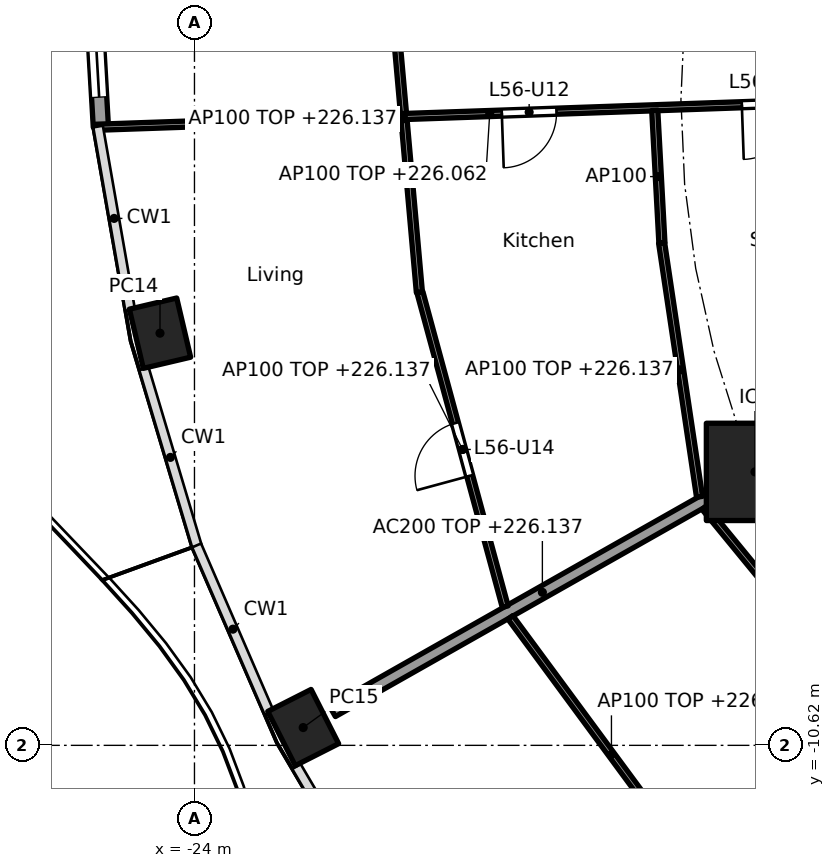
"""IFC4 building model, lengths in metres.
Left out: names, types, materials, properties, quantities, classifications, styles, units other than length and angle.
Written with IfcOpenShell. Run it as: python <this file> out.ifc"""

import sys

from ifc_helpers import new_model, si_unit, direction, frame, frame_2d, origin, origin_2d, place, context, subcontext, project, spatial, rectangle, hollow_rectangle, extrude, element, fill, save


model = new_model("IFC4")
c1 = context("Model", 3, precision=1e-05, world=origin(), true_north=direction((0.0, 1.0)))
c2 = subcontext(c1, "Body", "Model", "MODEL_VIEW")
j1 = project(units=[si_unit("LENGTHUNIT", "METRE"), si_unit("PLANEANGLEUNIT", "RADIAN")], contexts=[c1])
p1 = place(None, origin())
s1 = spatial("IfcSite", under=j1, at=p1, CompositionType="ELEMENT")
p2 = place(p1, origin())
s2 = spatial("IfcBuilding", under=s1, at=p2, CompositionType="ELEMENT")
p3 = place(p2, frame((0.0, 0.0, 223.3)))
s3 = spatial("IfcBuildingStorey", under=s2, at=p3, CompositionType="ELEMENT", Elevation=223.3)
for number, where, z_axis, x_axis in (
    (1, (-24.567, -3.842, 0.0), (0.0, 0.0, 1.0), (0.229, -0.973, 0.0)),
    (2, (-22.212, -10.327, 0.0), (0.0, 0.0, 1.0), (0.452, -0.892, 0.0)),
):
    element("IfcColumn", number, at=place(p3, frame(where, z_axis=z_axis, x_axis=x_axis)), inside=s3, PredefinedType="COLUMN", context=c2, shape_type="SweptSolid", body=[
        extrude(hollow_rectangle(XDim=1.0, YDim=0.8, WallThickness=0.032, at=origin_2d()), origin(), (0.0, 0.0, 1.0), 3.7),
    ])
p4 = place(p3, frame((-14.782, -6.123, 0.0), z_axis=(0.0, 0.0, 1.0), x_axis=(1.0, 0.0, 0.0)))
e3 = element("IfcColumn", 3, at=p4, inside=s3, PredefinedType="COLUMN", context=c2, shape_type="SweptSolid", body=[
    extrude(rectangle(XDim=1.6, YDim=1.6, at=origin_2d()), origin(), (0.0, 0.0, 1.0), 3.7),
])
p5 = place(p3, frame((-25.539, -0.45, 0.0), z_axis=(0.0, 0.0, 1.0), x_axis=(-0.057528189427, 0.998343882348, 0.0)))
e4 = element("IfcWall", 4, at=p5, inside=s3, PredefinedType="SOLIDWALL", context=c2, shape_type="SweptSolid", body=[
    extrude(rectangle(XDim=3.081, YDim=0.25, at=frame_2d((1.541, 0.0))), origin(), (0.0, 0.0, 1.0), 3.44),
])
p6 = place(p5, frame((0.49, 0.0, 0.0)))
e5 = element("IfcOpeningElement", 5, at=p6, cuts=e4, PredefinedType="OPENING", context=c2, shape_type="SweptSolid", body=[
    extrude(rectangle(XDim=2.1, YDim=2.4, at=frame_2d((1.05, 1.2))), frame((0.0, 0.135, 0.0), z_axis=(0.0, -1.0, 0.0), x_axis=(1.0, 0.0, 0.0)), (0.0, 0.0, 1.0), 0.27),
])
p7 = place(p3, frame((-14.825, -6.148, 0.0), z_axis=(0.0, 0.0, 1.0), x_axis=(-0.870099576105, -0.492875975944, 0.0)))
e6 = element("IfcWall", 6, at=p7, inside=s3, PredefinedType="PARTITIONING", context=c2, shape_type="SweptSolid", body=[
    extrude(rectangle(XDim=7.937, YDim=0.2, at=frame_2d((3.969, 0.0))), origin(), (0.0, 0.0, 1.0), 2.837),
])
p8 = place(p3, frame((-20.81, 2.542, 0.0), z_axis=(0.0, 0.0, 1.0), x_axis=(0.088651453697, -0.996062708748, 0.0)))
e7 = element("IfcWall", 7, at=p8, inside=s3, PredefinedType="PARTITIONING", context=c2, shape_type="SweptSolid", body=[
    extrude(rectangle(XDim=5.737, YDim=0.1, at=frame_2d((2.868, 0.0))), origin(), (0.0, 0.0, 1.0), 2.837),
])
p9 = place(p3, frame((-12.665, -0.003, 0.0), z_axis=(0.0, 0.0, 1.0), x_axis=(-0.999390583608, -0.034906466382, 0.0)))
e8 = element("IfcWall", 8, at=p9, inside=s3, PredefinedType="PARTITIONING", context=c2, shape_type="SweptSolid", body=[
    extrude(rectangle(XDim=12.967, YDim=0.1, at=frame_2d((6.483, 0.0))), origin(), (0.0, 0.0, 1.0), 2.762),
])
p10 = place(p9, frame((1.435, 0.0, 0.0)))
e9 = element("IfcOpeningElement", 9, at=p10, cuts=e8, PredefinedType="OPENING", context=c2, shape_type="SweptSolid", body=[
    extrude(rectangle(XDim=0.9, YDim=2.1, at=frame_2d((0.45, 1.05))), frame((0.0, 0.06, 0.0), z_axis=(0.0, -1.0, 0.0), x_axis=(1.0, 0.0, 0.0)), (0.0, 0.0, 1.0), 0.12),
])
p11 = place(p9, frame((5.385, 0.0, 0.0)))
e10 = element("IfcOpeningElement", 10, at=p11, cuts=e8, PredefinedType="OPENING", context=c2, shape_type="SweptSolid", body=[
    extrude(rectangle(XDim=0.9, YDim=2.1, at=frame_2d((0.45, 1.05))), frame((0.0, 0.06, 0.0), z_axis=(0.0, -1.0, 0.0), x_axis=(1.0, 0.0, 0.0)), (0.0, 0.0, 1.0), 0.12),
])
p12 = place(p3, frame((-16.431, -0.178, 0.0), z_axis=(0.0, 0.0, 1.0), x_axis=(0.053951127036, -0.998543577362, 0.0)))
e11 = element("IfcWall", 11, at=p12, inside=s3, PredefinedType="PARTITIONING", context=c2, shape_type="SweptSolid", body=[
    extrude(rectangle(XDim=2.181, YDim=0.1, at=frame_2d((1.091, 0.0))), origin(), (0.0, 0.0, 1.0), 3.44),
])
p13 = place(p3, frame((-16.318, -2.356, 0.0), z_axis=(0.0, 0.0, 1.0), x_axis=(0.147684413341, -0.989034536331, 0.0)))
e12 = element("IfcWall", 12, at=p13, inside=s3, PredefinedType="PARTITIONING", context=c2, shape_type="SweptSolid", body=[
    extrude(rectangle(XDim=4.222, YDim=0.1, at=frame_2d((2.111, 0.0))), origin(), (0.0, 0.0, 1.0), 2.837),
])
p14 = place(p3, frame((-20.292, -3.17, 0.0), z_axis=(0.0, 0.0, 1.0), x_axis=(0.26187906236, -0.965100697698, 0.0)))
e13 = element("IfcWall", 13, at=p14, inside=s3, PredefinedType="PARTITIONING", context=c2, shape_type="SweptSolid", body=[
    extrude(rectangle(XDim=5.356, YDim=0.1, at=frame_2d((2.678, 0.0))), origin(), (0.0, 0.0, 1.0), 2.837),
])
p15 = place(p14, frame((2.228, 0.0, 0.0)))
e14 = element("IfcOpeningElement", 14, at=p15, cuts=e13, PredefinedType="OPENING", context=c2, shape_type="SweptSolid", body=[
    extrude(rectangle(XDim=0.9, YDim=2.1, at=frame_2d((0.45, 1.05))), frame((0.0, 0.06, 0.0), z_axis=(0.0, -1.0, 0.0), x_axis=(1.0, 0.0, 0.0)), (0.0, 0.0, 1.0), 0.12),
])
p16 = place(p3, frame((-15.616, -6.708, 0.0), z_axis=(0.0, 0.0, 1.0), x_axis=(0.634076422357, -0.773270386483, 0.0)))
e15 = element("IfcWall", 15, at=p16, inside=s3, PredefinedType="PARTITIONING", context=c2, shape_type="SweptSolid", body=[
    extrude(rectangle(XDim=4.611, YDim=0.1, at=frame_2d((2.306, 0.0))), origin(), (0.0, 0.0, 1.0), 2.837),
])
p17 = place(p3, frame((-18.804, -8.516, 0.0), z_axis=(0.0, 0.0, 1.0), x_axis=(0.593249583583, -0.805018590828, 0.0)))
e16 = element("IfcWall", 16, at=p17, inside=s3, PredefinedType="PARTITIONING", context=c2, shape_type="SweptSolid", body=[
    extrude(rectangle(XDim=5.602, YDim=0.1, at=frame_2d((2.801, 0.0))), origin(), (0.0, 0.0, 1.0), 2.837),
])
p18 = place(p6, origin())
e17 = element("IfcDoor", 17, at=p18, inside=s3, OperationType="SLIDING_TO_LEFT", PredefinedType="DOOR", context=c2, shape_type="SweptSolid", body=[
    extrude(rectangle(XDim=2.1, YDim=2.4, at=frame_2d((1.05, 1.2))), frame((0.0, 0.025, 0.0), z_axis=(0.0, -1.0, 0.0), x_axis=(1.0, 0.0, 0.0)), (0.0, 0.0, 1.0), 0.05),
])
fill(e5, e17)
p19 = place(p10, origin())
e18 = element("IfcDoor", 18, at=p19, inside=s3, OperationType="SINGLE_SWING_RIGHT", PredefinedType="DOOR", context=c2, shape_type="SweptSolid", body=[
    extrude(rectangle(XDim=0.9, YDim=2.1, at=frame_2d((0.45, 1.05))), frame((0.0, 0.025, 0.0), z_axis=(0.0, -1.0, 0.0), x_axis=(1.0, 0.0, 0.0)), (0.0, 0.0, 1.0), 0.05),
])
fill(e9, e18)
p20 = place(p11, origin())
e19 = element("IfcDoor", 19, at=p20, inside=s3, OperationType="SINGLE_SWING_RIGHT", PredefinedType="DOOR", context=c2, shape_type="SweptSolid", body=[
    extrude(rectangle(XDim=0.9, YDim=2.1, at=frame_2d((0.45, 1.05))), frame((0.0, 0.025, 0.0), z_axis=(0.0, -1.0, 0.0), x_axis=(1.0, 0.0, 0.0)), (0.0, 0.0, 1.0), 0.05),
])
fill(e10, e19)
p21 = place(p15, frame((0.9, 0.0, 0.0), x_axis=(-1.0, 0.0, 0.0)))
e20 = element("IfcDoor", 20, at=p21, inside=s3, OperationType="SINGLE_SWING_LEFT", PredefinedType="DOOR", context=c2, shape_type="SweptSolid", body=[
    extrude(rectangle(XDim=0.9, YDim=2.1, at=frame_2d((0.45, 1.05))), frame((0.0, 0.025, 0.0), z_axis=(0.0, -1.0, 0.0), x_axis=(1.0, 0.0, 0.0)), (0.0, 0.0, 1.0), 0.05),
])
fill(e14, e20)
save(model, sys.argv[1])
